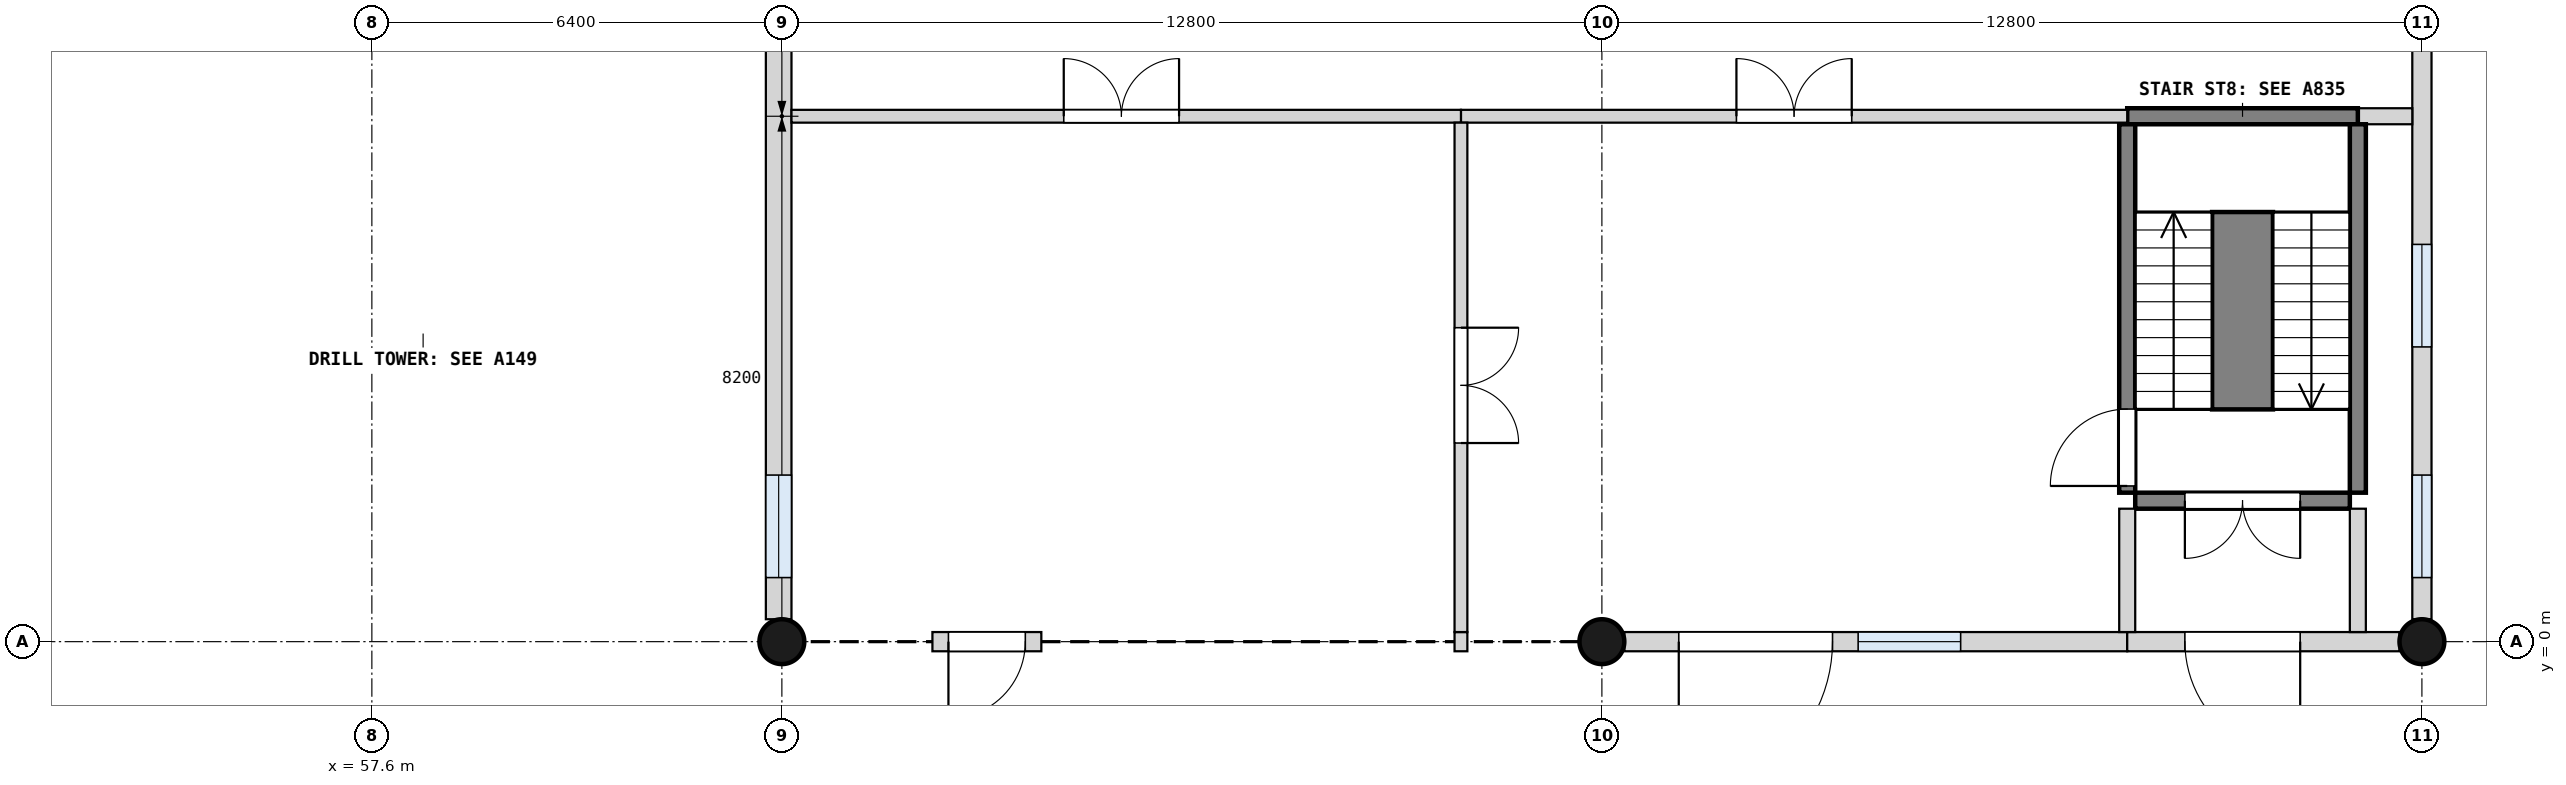
"""IFC4 building model, lengths in metres.
Left out: names, types, materials, properties, quantities, classifications, styles, units other than length and angle.
Written with IfcOpenShell. Run it as: python <this file> out.ifc"""

import sys

from ifc_helpers import new_model, si_unit, direction, frame, frame_2d, origin, origin_2d, place, context, subcontext, project, spatial, polyline, rectangle, circle, outline, extrude, element, fill, save


model = new_model("IFC4")
c1 = context("Model", 3, precision=1e-05, world=origin(), true_north=direction((0.0, 1.0)))
c2 = subcontext(c1, "Body", "Model", "MODEL_VIEW")
j1 = project(units=[si_unit("LENGTHUNIT", "METRE"), si_unit("PLANEANGLEUNIT", "RADIAN")], contexts=[c1])
p1 = place(None, origin())
s1 = spatial("IfcSite", under=j1, at=p1, CompositionType="ELEMENT")
p2 = place(p1, origin())
s2 = spatial("IfcBuilding", under=s1, at=p2, CompositionType="ELEMENT")
p3 = place(p2, origin())
s3 = spatial("IfcBuildingStorey", under=s2, at=p3, CompositionType="ELEMENT", Elevation=0.0)
for number, where, z_axis, x_axis in (
    (1, (89.6, 0.0, 0.0), (0.0, 0.0, 1.0), (1.0, 0.0, 0.0)),
    (2, (76.8, 0.0, 0.0), (0.0, 0.0, 1.0), (1.0, 0.0, 0.0)),
    (3, (64.0, 0.0, 0.0), (0.0, 0.0, 1.0), (1.0, 0.0, 0.0)),
):
    element("IfcColumn", number, at=place(p3, frame(where, z_axis=z_axis, x_axis=x_axis)), inside=s3, PredefinedType="COLUMN", context=c2, shape_type="SweptSolid", body=[
        extrude(circle(Radius=0.35, at=origin_2d()), origin(), (0.0, 0.0, 1.0), 4.2),
    ])
p4 = place(p3, frame((53.4, 4.8, -0.25), z_axis=(0.0, 0.0, 1.0), x_axis=(1.0, 0.0, 0.0)))
e4 = element("IfcWall", 4, at=p4, inside=s3, PredefinedType="SHEAR", context=c2, shape_type="SweptSolid", body=[
    extrude(rectangle(XDim=10.35, YDim=0.4, at=frame_2d((5.175, 0.0))), origin(), (0.0, 0.0, 1.0), 4.45),
])
p5 = place(p4, frame((1.8, 0.0, 0.25)))
e5 = element("IfcOpeningElement", 5, at=p5, cuts=e4, PredefinedType="OPENING", context=c2, shape_type="SweptSolid", body=[
    extrude(rectangle(XDim=1.2, YDim=2.1, at=frame_2d((0.6, 1.05))), frame((0.0, 0.21, 0.0), z_axis=(0.0, -1.0, 0.0), x_axis=(1.0, 0.0, 0.0)), (0.0, 0.0, 1.0), 0.42),
])
for number, where, z_axis, x_axis in (
    (6, (63.2, 5.0, -0.25), (0.0, 0.0, 1.0), (0.0, 1.0, 0.0)),
    (7, (53.6, 5.0, -0.25), (0.0, 0.0, 1.0), (0.0, 1.0, 0.0)),
):
    element("IfcWall", number, at=place(p3, frame(where, z_axis=z_axis, x_axis=x_axis)), inside=s3, PredefinedType="SHEAR", context=c2, shape_type="SweptSolid", body=[
        extrude(rectangle(XDim=9.2, YDim=0.4, at=frame_2d((4.6, 0.0))), origin(), (0.0, 0.0, 1.0), 4.45),
    ])
for number, where, z_axis, x_axis in (
    (8, (49.6, 9.6, 0.0), (0.0, 0.0, 1.0), (1.0, 0.0, 0.0)),
    (9, (58.4, 0.8, 0.0), (0.0, 0.0, 1.0), (0.0, 1.0, 0.0)),
):
    element("IfcWall", number, at=place(p3, frame(where, z_axis=z_axis, x_axis=x_axis)), inside=s3, PredefinedType="SHEAR", context=c2, shape_type="SweptSolid", body=[
        extrude(outline(polyline([(0.0, 0.0), (4.0, 0.0), (4.0, 14.0), (0.0, 0.4), (0.0, 0.0)])), frame((0.0, 0.6, 0.0), z_axis=(0.0, -1.0, 0.0), x_axis=(1.0, 0.0, 0.0)), (0.0, 0.0, 1.0), 1.2),
    ])
p6 = place(p3, frame((66.35, 0.0, 0.0), z_axis=(0.0, 0.0, 1.0), x_axis=(1.0, 0.0, 0.0)))
e10 = element("IfcWall", 10, at=p6, inside=s3, PredefinedType="SOLIDWALL", context=c2, shape_type="SweptSolid", body=[
    extrude(rectangle(XDim=1.7, YDim=0.3, at=frame_2d((0.85, 0.0))), origin(), (0.0, 0.0, 1.0), 3.0),
])
p7 = place(p6, frame((0.25, 0.0, 0.0)))
e11 = element("IfcOpeningElement", 11, at=p7, cuts=e10, PredefinedType="OPENING", context=c2, shape_type="SweptSolid", body=[
    extrude(rectangle(XDim=1.2, YDim=2.4, at=frame_2d((0.6, 1.2))), frame((0.0, 0.16, 0.0), z_axis=(0.0, -1.0, 0.0), x_axis=(1.0, 0.0, 0.0)), (0.0, 0.0, 1.0), 0.32),
])
p8 = place(p3, frame((74.5, 0.0, 0.0), z_axis=(0.0, 0.0, 1.0), x_axis=(1.0, 0.0, 0.0)))
e12 = element("IfcWall", 12, at=p8, inside=s3, PredefinedType="SOLIDWALL", context=c2, shape_type="SweptSolid", body=[
    extrude(rectangle(XDim=0.2, YDim=0.3, at=frame_2d((0.1, 0.0))), origin(), (0.0, 0.0, 1.0), 3.0),
])
p9 = place(p3, frame((77.15, 0.0, 0.0), z_axis=(0.0, 0.0, 1.0), x_axis=(1.0, 0.0, 0.0)))
e13 = element("IfcWall", 13, at=p9, inside=s3, PredefinedType="SOLIDWALL", context=c2, shape_type="SweptSolid", body=[
    extrude(rectangle(XDim=7.85, YDim=0.3, at=frame_2d((3.925, 0.0))), origin(), (0.0, 0.0, 1.0), 3.0),
])
p10 = place(p9, frame((0.85, 0.0, 0.0)))
e14 = element("IfcOpeningElement", 14, at=p10, cuts=e13, PredefinedType="OPENING", context=c2, shape_type="SweptSolid", body=[
    extrude(rectangle(XDim=2.4, YDim=2.4, at=frame_2d((1.2, 1.2))), frame((0.0, 0.16, 0.0), z_axis=(0.0, -1.0, 0.0), x_axis=(1.0, 0.0, 0.0)), (0.0, 0.0, 1.0), 0.32),
])
p11 = place(p9, frame((3.65, 0.0, 0.3)))
e15 = element("IfcOpeningElement", 15, at=p11, cuts=e13, PredefinedType="OPENING", context=c2, shape_type="SweptSolid", body=[
    extrude(rectangle(XDim=1.6, YDim=2.4, at=frame_2d((0.8, 1.2))), frame((0.0, 0.16, 0.0), z_axis=(0.0, -1.0, 0.0), x_axis=(1.0, 0.0, 0.0)), (0.0, 0.0, 1.0), 0.32),
])
p12 = place(p3, frame((85.0, 0.0, 0.0), z_axis=(0.0, 0.0, 1.0), x_axis=(1.0, 0.0, 0.0)))
e16 = element("IfcWall", 16, at=p12, inside=s3, PredefinedType="SOLIDWALL", context=c2, shape_type="SweptSolid", body=[
    extrude(rectangle(XDim=4.25, YDim=0.3, at=frame_2d((2.125, 0.0))), origin(), (0.0, 0.0, 1.0), 3.0),
])
p13 = place(p12, frame((0.9, 0.0, 0.0)))
e17 = element("IfcOpeningElement", 17, at=p13, cuts=e16, PredefinedType="OPENING", context=c2, shape_type="SweptSolid", body=[
    extrude(rectangle(XDim=1.8, YDim=2.1, at=frame_2d((0.9, 1.05))), frame((0.0, 0.16, 0.0), z_axis=(0.0, -1.0, 0.0), x_axis=(1.0, 0.0, 0.0)), (0.0, 0.0, 1.0), 0.32),
])
p14 = place(p3, frame((89.6, 0.35, 0.0), z_axis=(0.0, 0.0, 1.0), x_axis=(0.0, 1.0, 0.0)))
e18 = element("IfcWall", 18, at=p14, inside=s3, PredefinedType="SOLIDWALL", context=c2, shape_type="SweptSolid", body=[
    extrude(rectangle(XDim=13.7, YDim=0.3, at=frame_2d((6.85, 0.0))), origin(), (0.0, 0.0, 1.0), 3.0),
])
p15 = place(p14, frame((0.65, 0.0, 0.3)))
e19 = element("IfcOpeningElement", 19, at=p15, cuts=e18, PredefinedType="OPENING", context=c2, shape_type="SweptSolid", body=[
    extrude(rectangle(XDim=1.6, YDim=2.4, at=frame_2d((0.8, 1.2))), frame((0.0, 0.16, 0.0), z_axis=(0.0, -1.0, 0.0), x_axis=(1.0, 0.0, 0.0)), (0.0, 0.0, 1.0), 0.32),
])
p16 = place(p14, frame((4.25, 0.0, 0.3)))
e20 = element("IfcOpeningElement", 20, at=p16, cuts=e18, PredefinedType="OPENING", context=c2, shape_type="SweptSolid", body=[
    extrude(rectangle(XDim=1.6, YDim=2.4, at=frame_2d((0.8, 1.2))), frame((0.0, 0.16, 0.0), z_axis=(0.0, -1.0, 0.0), x_axis=(1.0, 0.0, 0.0)), (0.0, 0.0, 1.0), 0.32),
])
p17 = place(p14, frame((11.45, 0.0, 0.3)))
e21 = element("IfcOpeningElement", 21, at=p17, cuts=e18, PredefinedType="OPENING", context=c2, shape_type="SweptSolid", body=[
    extrude(rectangle(XDim=1.6, YDim=2.4, at=frame_2d((0.8, 1.2))), frame((0.0, 0.16, 0.0), z_axis=(0.0, -1.0, 0.0), x_axis=(1.0, 0.0, 0.0)), (0.0, 0.0, 1.0), 0.32),
])
p18 = place(p3, frame((63.95, 0.35, 0.0), z_axis=(0.0, 0.0, 1.0), x_axis=(0.0, 1.0, 0.0)))
e22 = element("IfcWall", 22, at=p18, inside=s3, PredefinedType="SOLIDWALL", context=c2, shape_type="SweptSolid", body=[
    extrude(rectangle(XDim=13.7, YDim=0.4, at=frame_2d((6.85, 0.0))), origin(), (0.0, 0.0, 1.0), 3.0),
])
p19 = place(p18, frame((0.65, 0.0, 0.3)))
e23 = element("IfcOpeningElement", 23, at=p19, cuts=e22, PredefinedType="OPENING", context=c2, shape_type="SweptSolid", body=[
    extrude(rectangle(XDim=1.6, YDim=2.4, at=frame_2d((0.8, 1.2))), frame((0.0, 0.21, 0.0), z_axis=(0.0, -1.0, 0.0), x_axis=(1.0, 0.0, 0.0)), (0.0, 0.0, 1.0), 0.42),
])
p20 = place(p18, frame((11.45, 0.0, 0.3)))
e24 = element("IfcOpeningElement", 24, at=p20, cuts=e22, PredefinedType="OPENING", context=c2, shape_type="SweptSolid", body=[
    extrude(rectangle(XDim=1.6, YDim=2.4, at=frame_2d((0.8, 1.2))), frame((0.0, 0.21, 0.0), z_axis=(0.0, -1.0, 0.0), x_axis=(1.0, 0.0, 0.0)), (0.0, 0.0, 1.0), 0.42),
])
p21 = place(p3, frame((88.475, 2.2, 0.0), z_axis=(0.0, 0.0, 1.0), x_axis=(-1.0, 0.0, 0.0)))
e25 = element("IfcWall", 25, at=p21, inside=s3, PredefinedType="SHEAR", context=c2, shape_type="SweptSolid", body=[
    extrude(rectangle(XDim=3.35, YDim=0.25, at=frame_2d((1.675, 0.0))), origin(), (0.0, 0.0, 1.0), 3.9),
])
p22 = place(p21, frame((0.775, 0.0, 0.0)))
e26 = element("IfcOpeningElement", 26, at=p22, cuts=e25, PredefinedType="OPENING", context=c2, shape_type="SweptSolid", body=[
    extrude(rectangle(XDim=1.8, YDim=2.1, at=frame_2d((0.9, 1.05))), frame((0.0, 0.135, 0.0), z_axis=(0.0, -1.0, 0.0), x_axis=(1.0, 0.0, 0.0)), (0.0, 0.0, 1.0), 0.27),
])
p23 = place(p3, frame((89.45, 8.2, 0.0), z_axis=(0.0, 0.0, 1.0), x_axis=(-1.0, 0.0, 0.0)))
e27 = element("IfcWall", 27, at=p23, inside=s3, PredefinedType="PARTITIONING", context=c2, shape_type="SweptSolid", body=[
    extrude(rectangle(XDim=0.85, YDim=0.25, at=frame_2d((0.425, 0.0))), origin(), (0.0, 0.0, 1.0), 3.9),
])
p24 = place(p3, frame((88.6, 8.2, 0.0), z_axis=(0.0, 0.0, 1.0), x_axis=(-1.0, 0.0, 0.0)))
e28 = element("IfcWall", 28, at=p24, inside=s3, PredefinedType="SHEAR", context=c2, shape_type="SweptSolid", body=[
    extrude(rectangle(XDim=3.6, YDim=0.25, at=frame_2d((1.8, 0.0))), origin(), (0.0, 0.0, 1.0), 3.9),
])
p25 = place(p3, frame((85.0, 8.2, 0.0), z_axis=(0.0, 0.0, 1.0), x_axis=(-1.0, 0.0, 0.0)))
e29 = element("IfcWall", 29, at=p25, inside=s3, PredefinedType="PARTITIONING", context=c2, shape_type="SweptSolid", body=[
    extrude(rectangle(XDim=10.4, YDim=0.2, at=frame_2d((5.2, 0.0))), origin(), (0.0, 0.0, 1.0), 3.9),
])
p26 = place(p25, frame((4.3, 0.0, 0.0)))
e30 = element("IfcOpeningElement", 30, at=p26, cuts=e29, PredefinedType="OPENING", context=c2, shape_type="SweptSolid", body=[
    extrude(rectangle(XDim=1.8, YDim=2.1, at=frame_2d((0.9, 1.05))), frame((0.0, 0.11, 0.0), z_axis=(0.0, -1.0, 0.0), x_axis=(1.0, 0.0, 0.0)), (0.0, 0.0, 1.0), 0.22),
])
p27 = place(p3, frame((74.6, 8.2, 0.0), z_axis=(0.0, 0.0, 1.0), x_axis=(-1.0, 0.0, 0.0)))
e31 = element("IfcWall", 31, at=p27, inside=s3, PredefinedType="PARTITIONING", context=c2, shape_type="SweptSolid", body=[
    extrude(rectangle(XDim=10.45, YDim=0.2, at=frame_2d((5.225, 0.0))), origin(), (0.0, 0.0, 1.0), 3.9),
])
p28 = place(p27, frame((4.4, 0.0, 0.0)))
e32 = element("IfcOpeningElement", 32, at=p28, cuts=e31, PredefinedType="OPENING", context=c2, shape_type="SweptSolid", body=[
    extrude(rectangle(XDim=1.8, YDim=2.1, at=frame_2d((0.9, 1.05))), frame((0.0, 0.11, 0.0), z_axis=(0.0, -1.0, 0.0), x_axis=(1.0, 0.0, 0.0)), (0.0, 0.0, 1.0), 0.22),
])
p29 = place(p3, frame((88.6, 0.15, 0.0), z_axis=(0.0, 0.0, 1.0), x_axis=(0.0, 1.0, 0.0)))
e33 = element("IfcWall", 33, at=p29, inside=s3, PredefinedType="PARTITIONING", context=c2, shape_type="SweptSolid", body=[
    extrude(rectangle(XDim=1.925, YDim=0.25, at=frame_2d((0.962, 0.0))), origin(), (0.0, 0.0, 1.0), 3.9),
])
p30 = place(p3, frame((88.6, 2.325, 0.0), z_axis=(0.0, 0.0, 1.0), x_axis=(0.0, 1.0, 0.0)))
e34 = element("IfcWall", 34, at=p30, inside=s3, PredefinedType="SHEAR", context=c2, shape_type="SweptSolid", body=[
    extrude(rectangle(XDim=5.75, YDim=0.25, at=frame_2d((2.875, 0.0))), origin(), (0.0, 0.0, 1.0), 3.9),
])
p31 = place(p3, frame((85.0, 0.15, 0.0), z_axis=(0.0, 0.0, 1.0), x_axis=(0.0, 1.0, 0.0)))
e35 = element("IfcWall", 35, at=p31, inside=s3, PredefinedType="PARTITIONING", context=c2, shape_type="SweptSolid", body=[
    extrude(rectangle(XDim=1.925, YDim=0.25, at=frame_2d((0.962, 0.0))), origin(), (0.0, 0.0, 1.0), 3.9),
])
p32 = place(p3, frame((85.0, 2.325, 0.0), z_axis=(0.0, 0.0, 1.0), x_axis=(0.0, 1.0, 0.0)))
e36 = element("IfcWall", 36, at=p32, inside=s3, PredefinedType="SHEAR", context=c2, shape_type="SweptSolid", body=[
    extrude(rectangle(XDim=5.75, YDim=0.25, at=frame_2d((2.875, 0.0))), origin(), (0.0, 0.0, 1.0), 3.9),
])
p33 = place(p32, frame((0.105, 0.0, 0.0)))
e37 = element("IfcOpeningElement", 37, at=p33, cuts=e36, PredefinedType="OPENING", context=c2, shape_type="SweptSolid", body=[
    extrude(rectangle(XDim=1.2, YDim=2.1, at=frame_2d((0.6, 1.05))), frame((0.0, 0.135, 0.0), z_axis=(0.0, -1.0, 0.0), x_axis=(1.0, 0.0, 0.0)), (0.0, 0.0, 1.0), 0.27),
])
p34 = place(p3, frame((74.6, 0.15, 0.0), z_axis=(0.0, 0.0, 1.0), x_axis=(0.0, 1.0, 0.0)))
e38 = element("IfcWall", 38, at=p34, inside=s3, PredefinedType="PARTITIONING", context=c2, shape_type="SweptSolid", body=[
    extrude(rectangle(XDim=7.95, YDim=0.2, at=frame_2d((3.975, 0.0))), origin(), (0.0, 0.0, 1.0), 3.9),
])
p35 = place(p34, frame((2.95, 0.0, 0.0)))
e39 = element("IfcOpeningElement", 39, at=p35, cuts=e38, PredefinedType="OPENING", context=c2, shape_type="SweptSolid", body=[
    extrude(rectangle(XDim=1.8, YDim=2.1, at=frame_2d((0.9, 1.05))), frame((0.0, 0.11, 0.0), z_axis=(0.0, -1.0, 0.0), x_axis=(1.0, 0.0, 0.0)), (0.0, 0.0, 1.0), 0.22),
])
p36 = place(p3, frame((86.8, 3.625, 0.0), z_axis=(0.0, 0.0, 1.0), x_axis=(0.0, 1.0, 0.0)))
e40 = element("IfcWall", 40, at=p36, inside=s3, PredefinedType="SHEAR", context=c2, shape_type="SweptSolid", body=[
    extrude(rectangle(XDim=3.08, YDim=0.95, at=frame_2d((1.54, 0.0))), origin(), (0.0, 0.0, 1.0), 4.2),
])
p37 = place(p7, frame((1.2, 0.0, 0.0), z_axis=(0.0, 0.0, 1.0), x_axis=(-1.0, 0.0, 0.0)))
e41 = element("IfcDoor", 41, at=p37, inside=s3, OperationType="SINGLE_SWING_RIGHT", PredefinedType="DOOR", context=c2, shape_type="SweptSolid", body=[
    extrude(rectangle(XDim=1.2, YDim=2.4, at=frame_2d((0.6, 1.2))), frame((0.0, 0.025, 0.0), z_axis=(0.0, -1.0, 0.0), x_axis=(1.0, 0.0, 0.0)), (0.0, 0.0, 1.0), 0.05),
])
fill(e11, e41)
p38 = place(p10, frame((2.4, 0.0, 0.0), z_axis=(0.0, 0.0, 1.0), x_axis=(-1.0, 0.0, 0.0)))
e42 = element("IfcDoor", 42, at=p38, inside=s3, OperationType="SINGLE_SWING_RIGHT", PredefinedType="DOOR", context=c2, shape_type="SweptSolid", body=[
    extrude(rectangle(XDim=2.4, YDim=2.4, at=frame_2d((1.2, 1.2))), frame((0.0, 0.025, 0.0), z_axis=(0.0, -1.0, 0.0), x_axis=(1.0, 0.0, 0.0)), (0.0, 0.0, 1.0), 0.05),
])
fill(e14, e42)
p39 = place(p13, frame((1.8, 0.0, 0.0), z_axis=(0.0, 0.0, 1.0), x_axis=(-1.0, 0.0, 0.0)))
e43 = element("IfcDoor", 43, at=p39, inside=s3, OperationType="SINGLE_SWING_LEFT", PredefinedType="DOOR", context=c2, shape_type="SweptSolid", body=[
    extrude(rectangle(XDim=1.8, YDim=2.1, at=frame_2d((0.9, 1.05))), frame((0.0, 0.025, 0.0), z_axis=(0.0, -1.0, 0.0), x_axis=(1.0, 0.0, 0.0)), (0.0, 0.0, 1.0), 0.05),
])
fill(e17, e43)
p40 = place(p5, frame((1.2, 0.0, 0.0), z_axis=(0.0, 0.0, 1.0), x_axis=(-1.0, 0.0, 0.0)))
e44 = element("IfcDoor", 44, at=p40, inside=s3, OperationType="SINGLE_SWING_LEFT", PredefinedType="DOOR", context=c2, shape_type="SweptSolid", body=[
    extrude(rectangle(XDim=1.2, YDim=2.1, at=frame_2d((0.6, 1.05))), frame((0.0, 0.025, 0.0), z_axis=(0.0, -1.0, 0.0), x_axis=(1.0, 0.0, 0.0)), (0.0, 0.0, 1.0), 0.05),
])
fill(e5, e44)
p41 = place(p33, origin())
e45 = element("IfcDoor", 45, at=p41, inside=s3, OperationType="SINGLE_SWING_LEFT", PredefinedType="DOOR", context=c2, shape_type="SweptSolid", body=[
    extrude(rectangle(XDim=1.2, YDim=2.1, at=frame_2d((0.6, 1.05))), frame((0.0, 0.025, 0.0), z_axis=(0.0, -1.0, 0.0), x_axis=(1.0, 0.0, 0.0)), (0.0, 0.0, 1.0), 0.05),
])
fill(e37, e45)
p42 = place(p22, origin())
e46 = element("IfcDoor", 46, at=p42, inside=s3, OperationType="DOUBLE_DOOR_SINGLE_SWING", PredefinedType="DOOR", context=c2, shape_type="SweptSolid", body=[
    extrude(rectangle(XDim=1.8, YDim=2.1, at=frame_2d((0.9, 1.05))), frame((0.0, 0.025, 0.0), z_axis=(0.0, -1.0, 0.0), x_axis=(1.0, 0.0, 0.0)), (0.0, 0.0, 1.0), 0.05),
])
fill(e26, e46)
p43 = place(p35, frame((1.8, 0.0, 0.0), z_axis=(0.0, 0.0, 1.0), x_axis=(-1.0, 0.0, 0.0)))
e47 = element("IfcDoor", 47, at=p43, inside=s3, OperationType="DOUBLE_DOOR_SINGLE_SWING", PredefinedType="DOOR", context=c2, shape_type="SweptSolid", body=[
    extrude(rectangle(XDim=1.8, YDim=2.1, at=frame_2d((0.9, 1.05))), frame((0.0, 0.025, 0.0), z_axis=(0.0, -1.0, 0.0), x_axis=(1.0, 0.0, 0.0)), (0.0, 0.0, 1.0), 0.05),
])
fill(e39, e47)
p44 = place(p26, frame((1.8, 0.0, 0.0), z_axis=(0.0, 0.0, 1.0), x_axis=(-1.0, 0.0, 0.0)))
e48 = element("IfcDoor", 48, at=p44, inside=s3, OperationType="DOUBLE_DOOR_SINGLE_SWING", PredefinedType="DOOR", context=c2, shape_type="SweptSolid", body=[
    extrude(rectangle(XDim=1.8, YDim=2.1, at=frame_2d((0.9, 1.05))), frame((0.0, 0.025, 0.0), z_axis=(0.0, -1.0, 0.0), x_axis=(1.0, 0.0, 0.0)), (0.0, 0.0, 1.0), 0.05),
])
fill(e30, e48)
p45 = place(p28, frame((1.8, 0.0, 0.0), z_axis=(0.0, 0.0, 1.0), x_axis=(-1.0, 0.0, 0.0)))
e49 = element("IfcDoor", 49, at=p45, inside=s3, OperationType="DOUBLE_DOOR_SINGLE_SWING", PredefinedType="DOOR", context=c2, shape_type="SweptSolid", body=[
    extrude(rectangle(XDim=1.8, YDim=2.1, at=frame_2d((0.9, 1.05))), frame((0.0, 0.025, 0.0), z_axis=(0.0, -1.0, 0.0), x_axis=(1.0, 0.0, 0.0)), (0.0, 0.0, 1.0), 0.05),
])
fill(e32, e49)
p46 = place(p11, origin())
e50 = element("IfcWindow", 50, at=p46, inside=s3, PartitioningType="SINGLE_PANEL", PredefinedType="WINDOW", context=c2, shape_type="SweptSolid", body=[
    extrude(rectangle(XDim=1.6, YDim=2.4, at=frame_2d((0.8, 1.2))), frame((0.0, 0.03, 0.0), z_axis=(0.0, -1.0, 0.0), x_axis=(1.0, 0.0, 0.0)), (0.0, 0.0, 1.0), 0.06),
])
fill(e15, e50)
p47 = place(p15, origin())
e51 = element("IfcWindow", 51, at=p47, inside=s3, PartitioningType="SINGLE_PANEL", PredefinedType="WINDOW", context=c2, shape_type="SweptSolid", body=[
    extrude(rectangle(XDim=1.6, YDim=2.4, at=frame_2d((0.8, 1.2))), frame((0.0, 0.03, 0.0), z_axis=(0.0, -1.0, 0.0), x_axis=(1.0, 0.0, 0.0)), (0.0, 0.0, 1.0), 0.06),
])
fill(e19, e51)
p48 = place(p16, origin())
e52 = element("IfcWindow", 52, at=p48, inside=s3, PartitioningType="SINGLE_PANEL", PredefinedType="WINDOW", context=c2, shape_type="SweptSolid", body=[
    extrude(rectangle(XDim=1.6, YDim=2.4, at=frame_2d((0.8, 1.2))), frame((0.0, 0.03, 0.0), z_axis=(0.0, -1.0, 0.0), x_axis=(1.0, 0.0, 0.0)), (0.0, 0.0, 1.0), 0.06),
])
fill(e20, e52)
p49 = place(p19, origin())
e53 = element("IfcWindow", 53, at=p49, inside=s3, PartitioningType="SINGLE_PANEL", PredefinedType="WINDOW", context=c2, shape_type="SweptSolid", body=[
    extrude(rectangle(XDim=1.6, YDim=2.4, at=frame_2d((0.8, 1.2))), frame((0.0, 0.03, 0.0), z_axis=(0.0, -1.0, 0.0), x_axis=(1.0, 0.0, 0.0)), (0.0, 0.0, 1.0), 0.06),
])
fill(e23, e53)
save(model, sys.argv[1])
